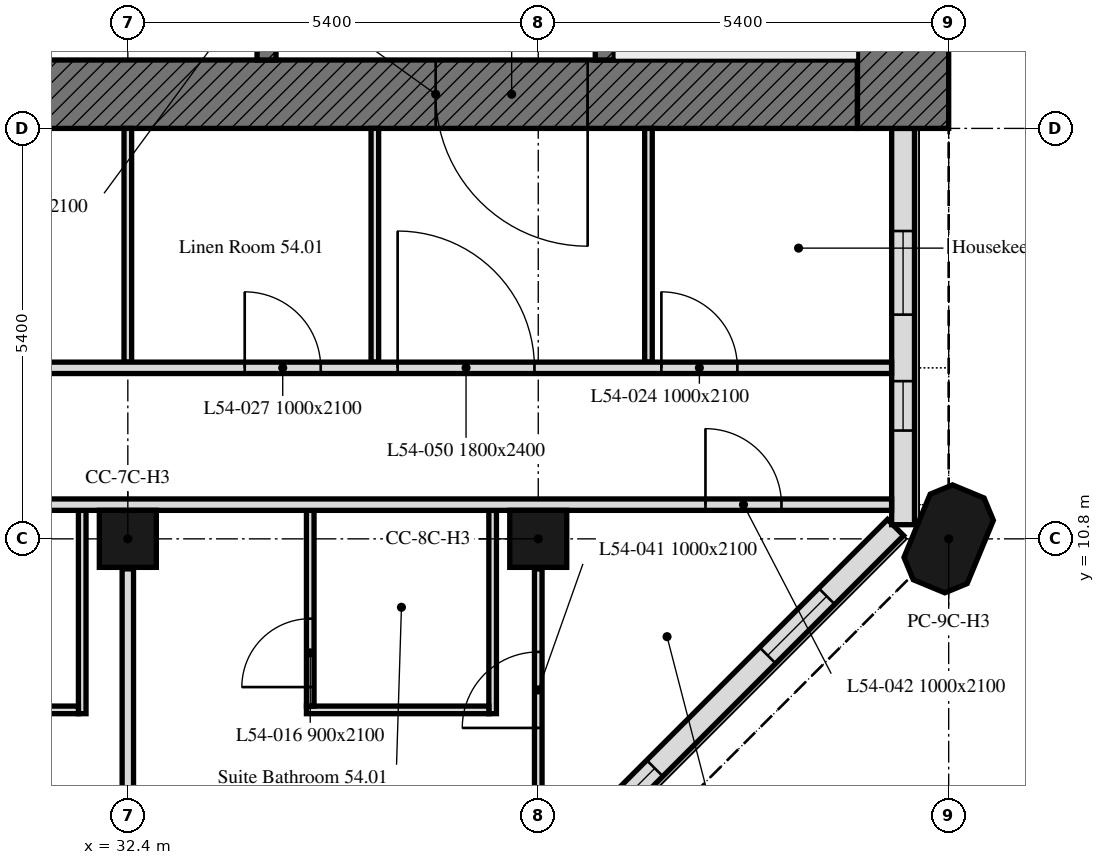
"""IFC4 building model, lengths in metres.
Left out: names, types, materials, properties, quantities, classifications, styles, units other than length and angle.
Written with IfcOpenShell. Run it as: python <this file> out.ifc"""

import sys

from ifc_helpers import new_model, si_unit, direction, frame, frame_2d, origin, origin_2d, place, context, subcontext, project, spatial, polyline, rectangle, outline, extrude, element, fill, save


model = new_model("IFC4")
c1 = context("Model", 3, precision=1e-05, world=origin(), true_north=direction((0.0, 1.0)))
c2 = subcontext(c1, "Body", "Model", "MODEL_VIEW")
j1 = project(units=[si_unit("LENGTHUNIT", "METRE"), si_unit("PLANEANGLEUNIT", "RADIAN")], contexts=[c1])
p1 = place(None, origin())
s1 = spatial("IfcSite", under=j1, at=p1, CompositionType="ELEMENT")
p2 = place(p1, origin())
s2 = spatial("IfcBuilding", under=s1, at=p2, CompositionType="ELEMENT")
p3 = place(p2, frame((0.0, 0.0, 217.0)))
s3 = spatial("IfcBuildingStorey", under=s2, at=p3, CompositionType="ELEMENT", Elevation=217.0)
for number, where, z_axis, x_axis in (
    (1, (32.4, 10.8, 0.0), (0.0, 0.0, 1.0), (1.0, 0.0, 0.0)),
    (2, (37.8, 10.8, 0.0), (0.0, 0.0, 1.0), (1.0, 0.0, 0.0)),
):
    element("IfcColumn", number, at=place(p3, frame(where, z_axis=z_axis, x_axis=x_axis)), inside=s3, PredefinedType="COLUMN", context=c2, shape_type="SweptSolid", body=[
        extrude(rectangle(XDim=0.75, YDim=0.75, at=origin_2d()), origin(), (0.0, 0.0, 1.0), 3.0),
    ])
p4 = place(p3, frame((43.2, 10.8, 0.0), z_axis=(0.0, 0.0, 1.0), x_axis=(0.382683432365, 0.923879532511, 0.0)))
e3 = element("IfcColumn", 3, at=p4, inside=s3, PredefinedType="COLUMN", context=c2, shape_type="SweptSolid", body=[
    extrude(outline(polyline([(-0.45, -0.45), (0.45, -0.45), (0.675, -0.225), (0.675, 0.225), (0.45, 0.45), (-0.45, 0.45), (-0.675, 0.225), (-0.675, -0.225), (-0.45, -0.45)])), origin(), (0.0, 0.0, 1.0), 3.0),
])
p5 = place(p3, frame((37.65, 6.099, 0.0), z_axis=(0.0, 0.0, 1.0), x_axis=(0.707106781187, 0.707106781187, 0.0)))
e4 = element("IfcWall", 4, at=p5, inside=s3, PredefinedType="SOLIDWALL", context=c2, shape_type="SweptSolid", body=[
    extrude(rectangle(XDim=6.86, YDim=0.3, at=frame_2d((3.43, 0.0))), origin(), (0.0, 0.0, 1.0), 3.0),
])
p6 = place(p5, frame((1.28, 0.0, 0.9)))
e5 = element("IfcOpeningElement", 5, at=p6, cuts=e4, PredefinedType="OPENING", context=c2, shape_type="SweptSolid", body=[
    extrude(rectangle(XDim=1.1, YDim=1.7, at=frame_2d((0.55, 0.85))), frame((0.0, 0.16, 0.0), z_axis=(0.0, -1.0, 0.0), x_axis=(1.0, 0.0, 0.0)), (0.0, 0.0, 1.0), 0.32),
])
p7 = place(p5, frame((4.48, 0.0, 0.9)))
e6 = element("IfcOpeningElement", 6, at=p7, cuts=e4, PredefinedType="OPENING", context=c2, shape_type="SweptSolid", body=[
    extrude(rectangle(XDim=1.1, YDim=1.7, at=frame_2d((0.55, 0.85))), frame((0.0, 0.16, 0.0), z_axis=(0.0, -1.0, 0.0), x_axis=(1.0, 0.0, 0.0)), (0.0, 0.0, 1.0), 0.32),
])
p8 = place(p3, frame((42.6, 10.986, 0.0), z_axis=(0.0, 0.0, 1.0), x_axis=(0.0, 1.0, 0.0)))
e7 = element("IfcWall", 7, at=p8, inside=s3, PredefinedType="SOLIDWALL", context=c2, shape_type="SweptSolid", body=[
    extrude(rectangle(XDim=5.214, YDim=0.3, at=frame_2d((2.607, 0.0))), origin(), (0.0, 0.0, 1.0), 3.0),
])
p9 = place(p8, frame((1.239, 0.0, 0.9)))
e8 = element("IfcOpeningElement", 8, at=p9, cuts=e7, PredefinedType="OPENING", context=c2, shape_type="SweptSolid", body=[
    extrude(rectangle(XDim=0.65, YDim=1.7, at=frame_2d((0.325, 0.85))), frame((0.0, 0.16, 0.0), z_axis=(0.0, -1.0, 0.0), x_axis=(1.0, 0.0, 0.0)), (0.0, 0.0, 1.0), 0.32),
])
p10 = place(p8, frame((2.764, 0.0, 0.9)))
e9 = element("IfcOpeningElement", 9, at=p10, cuts=e7, PredefinedType="OPENING", context=c2, shape_type="SweptSolid", body=[
    extrude(rectangle(XDim=1.1, YDim=1.7, at=frame_2d((0.55, 0.85))), frame((0.0, 0.16, 0.0), z_axis=(0.0, -1.0, 0.0), x_axis=(1.0, 0.0, 0.0)), (0.0, 0.0, 1.0), 0.32),
])
p11 = place(p3, frame((42.0, 16.65, 0.0), z_axis=(0.0, 0.0, 1.0), x_axis=(-1.0, 0.0, 0.0)))
e10 = element("IfcWall", 10, at=p11, inside=s3, PredefinedType="SOLIDWALL", context=c2, shape_type="SweptSolid", body=[
    extrude(rectangle(XDim=11.1, YDim=0.9, at=frame_2d((5.55, 0.0))), origin(), (0.0, 0.0, 1.0), 3.0),
])
p12 = place(p11, frame((3.55, 0.0, 0.0)))
e11 = element("IfcOpeningElement", 11, at=p12, cuts=e10, PredefinedType="OPENING", context=c2, shape_type="SweptSolid", body=[
    extrude(rectangle(XDim=2.0, YDim=2.4, at=frame_2d((1.0, 1.2))), frame((0.0, 0.45, 0.0), z_axis=(0.0, -1.0, 0.0), x_axis=(1.0, 0.0, 0.0)), (0.0, 0.0, 1.0), 0.9),
])
p13 = place(p3, frame((42.6, 32.4, 0.0), z_axis=(0.0, 0.0, 1.0), x_axis=(0.0, -1.0, 0.0)))
e12 = element("IfcWall", 12, at=p13, inside=s3, PredefinedType="SOLIDWALL", context=c2, shape_type="SweptSolid", body=[
    extrude(rectangle(XDim=16.2, YDim=1.2, at=frame_2d((8.1, 0.0))), origin(), (0.0, 0.0, 1.0), 3.0),
])
p14 = place(p3, frame((38.675, 17.1, 0.0), z_axis=(0.0, 0.0, 1.0), x_axis=(0.0, 1.0, 0.0)))
e13 = element("IfcWall", 13, at=p14, inside=s3, PredefinedType="SOLIDWALL", context=c2, shape_type="SweptSolid", body=[
    extrude(rectangle(XDim=14.4, YDim=0.25, at=frame_2d((7.2, 0.0))), origin(), (0.0, 0.0, 1.0), 3.0),
])
p15 = place(p14, frame((4.6, 0.0, 0.0)))
e14 = element("IfcOpeningElement", 14, at=p15, cuts=e13, PredefinedType="OPENING", context=c2, shape_type="SweptSolid", body=[
    extrude(rectangle(XDim=1.0, YDim=2.1, at=frame_2d((0.5, 1.05))), frame((0.0, 0.125, 0.0), z_axis=(0.0, -1.0, 0.0), x_axis=(1.0, 0.0, 0.0)), (0.0, 0.0, 1.0), 0.25),
])
p16 = place(p14, frame((7.062, 0.0, 0.0)))
e15 = element("IfcOpeningElement", 15, at=p16, cuts=e13, PredefinedType="OPENING", context=c2, shape_type="SweptSolid", body=[
    extrude(rectangle(XDim=1.2, YDim=2.1, at=frame_2d((0.6, 1.05))), frame((0.0, 0.125, 0.0), z_axis=(0.0, -1.0, 0.0), x_axis=(1.0, 0.0, 0.0)), (0.0, 0.0, 1.0), 0.25),
])
p17 = place(p14, frame((9.599, 0.0, 0.0)))
e16 = element("IfcOpeningElement", 16, at=p17, cuts=e13, PredefinedType="OPENING", context=c2, shape_type="SweptSolid", body=[
    extrude(rectangle(XDim=0.9, YDim=2.1, at=frame_2d((0.45, 1.05))), frame((0.0, 0.125, 0.0), z_axis=(0.0, -1.0, 0.0), x_axis=(1.0, 0.0, 0.0)), (0.0, 0.0, 1.0), 0.25),
])
p18 = place(p14, frame((11.032, 0.0, 0.0)))
e17 = element("IfcOpeningElement", 17, at=p18, cuts=e13, PredefinedType="OPENING", context=c2, shape_type="SweptSolid", body=[
    extrude(rectangle(XDim=0.9, YDim=2.1, at=frame_2d((0.45, 1.05))), frame((0.0, 0.125, 0.0), z_axis=(0.0, -1.0, 0.0), x_axis=(1.0, 0.0, 0.0)), (0.0, 0.0, 1.0), 0.25),
])
p19 = place(p14, frame((12.846, 0.0, 0.0)))
e18 = element("IfcOpeningElement", 18, at=p19, cuts=e13, PredefinedType="OPENING", context=c2, shape_type="SweptSolid", body=[
    extrude(rectangle(XDim=0.9, YDim=2.1, at=frame_2d((0.45, 1.05))), frame((0.0, 0.125, 0.0), z_axis=(0.0, -1.0, 0.0), x_axis=(1.0, 0.0, 0.0)), (0.0, 0.0, 1.0), 0.25),
])
p20 = place(p3, frame((34.225, 17.1, 0.0), z_axis=(0.0, 0.0, 1.0), x_axis=(0.0, 1.0, 0.0)))
e19 = element("IfcWall", 19, at=p20, inside=s3, PredefinedType="SOLIDWALL", context=c2, shape_type="SweptSolid", body=[
    extrude(rectangle(XDim=14.4, YDim=0.25, at=frame_2d((7.2, 0.0))), origin(), (0.0, 0.0, 1.0), 3.0),
])
p21 = place(p20, frame((13.15, 0.0, 0.0)))
e20 = element("IfcOpeningElement", 20, at=p21, cuts=e19, PredefinedType="OPENING", context=c2, shape_type="SweptSolid", body=[
    extrude(rectangle(XDim=1.0, YDim=2.1, at=frame_2d((0.5, 1.05))), frame((0.0, 0.125, 0.0), z_axis=(0.0, -1.0, 0.0), x_axis=(1.0, 0.0, 0.0)), (0.0, 0.0, 1.0), 0.25),
])
p22 = place(p20, frame((0.6, 0.0, 0.0)))
e21 = element("IfcOpeningElement", 21, at=p22, cuts=e19, PredefinedType="OPENING", context=c2, shape_type="SweptSolid", body=[
    extrude(rectangle(XDim=1.1, YDim=2.1, at=frame_2d((0.55, 1.05))), frame((0.0, 0.125, 0.0), z_axis=(0.0, -1.0, 0.0), x_axis=(1.0, 0.0, 0.0)), (0.0, 0.0, 1.0), 0.25),
])
p23 = place(p20, frame((3.25, 0.0, 0.0)))
e22 = element("IfcOpeningElement", 22, at=p23, cuts=e19, PredefinedType="OPENING", context=c2, shape_type="SweptSolid", body=[
    extrude(rectangle(XDim=0.9, YDim=2.1, at=frame_2d((0.45, 1.05))), frame((0.0, 0.125, 0.0), z_axis=(0.0, -1.0, 0.0), x_axis=(1.0, 0.0, 0.0)), (0.0, 0.0, 1.0), 0.25),
])
p24 = place(p3, frame((37.8, 6.512, 0.0), z_axis=(0.0, 0.0, 1.0), x_axis=(0.0, 1.0, 0.0)))
e23 = element("IfcWall", 23, at=p24, inside=s3, PredefinedType="PARTITIONING", context=c2, shape_type="SweptSolid", body=[
    extrude(rectangle(XDim=3.893, YDim=0.1, at=frame_2d((1.946, 0.0))), origin(), (0.0, 0.0, 1.0), 3.0),
])
p25 = place(p24, frame((1.8, 0.0, 0.0)))
e24 = element("IfcOpeningElement", 24, at=p25, cuts=e23, PredefinedType="OPENING", context=c2, shape_type="SweptSolid", body=[
    extrude(rectangle(XDim=1.0, YDim=2.1, at=frame_2d((0.5, 1.05))), frame((0.0, 0.05, 0.0), z_axis=(0.0, -1.0, 0.0), x_axis=(1.0, 0.0, 0.0)), (0.0, 0.0, 1.0), 0.1),
])
p26 = place(p3, frame((37.2, 11.175, 0.0), z_axis=(0.0, 0.0, 1.0), x_axis=(0.0, -1.0, 0.0)))
e25 = element("IfcWall", 25, at=p26, inside=s3, PredefinedType="PARTITIONING", context=c2, shape_type="SweptSolid", body=[
    extrude(rectangle(XDim=2.675, YDim=0.1, at=frame_2d((1.337, 0.0))), origin(), (0.0, 0.0, 1.0), 3.0),
])
p27 = place(p3, frame((37.15, 8.55, 0.0), z_axis=(0.0, 0.0, 1.0), x_axis=(-1.0, 0.0, 0.0)))
e26 = element("IfcWall", 26, at=p27, inside=s3, PredefinedType="PARTITIONING", context=c2, shape_type="SweptSolid", body=[
    extrude(rectangle(XDim=2.4, YDim=0.1, at=frame_2d((1.2, 0.0))), origin(), (0.0, 0.0, 1.0), 3.0),
])
p28 = place(p3, frame((34.8, 8.6, 0.0), z_axis=(0.0, 0.0, 1.0), x_axis=(0.0, 1.0, 0.0)))
e27 = element("IfcWall", 27, at=p28, inside=s3, PredefinedType="PARTITIONING", context=c2, shape_type="SweptSolid", body=[
    extrude(rectangle(XDim=2.575, YDim=0.1, at=frame_2d((1.288, 0.0))), origin(), (0.0, 0.0, 1.0), 3.0),
])
p29 = place(p28, frame((0.25, 0.0, 0.0)))
e28 = element("IfcOpeningElement", 28, at=p29, cuts=e27, PredefinedType="OPENING", context=c2, shape_type="SweptSolid", body=[
    extrude(rectangle(XDim=0.9, YDim=2.1, at=frame_2d((0.45, 1.05))), frame((0.0, 0.05, 0.0), z_axis=(0.0, -1.0, 0.0), x_axis=(1.0, 0.0, 0.0)), (0.0, 0.0, 1.0), 0.1),
])
p30 = place(p3, frame((32.4, 10.405, 0.0), z_axis=(0.0, 0.0, 1.0), x_axis=(0.0, -1.0, 0.0)))
e29 = element("IfcWall", 29, at=p30, inside=s3, PredefinedType="PARTITIONING", context=c2, shape_type="SweptSolid", body=[
    extrude(rectangle(XDim=4.254, YDim=0.15, at=frame_2d((2.127, 0.0))), origin(), (0.0, 0.0, 1.0), 3.0),
])
p31 = place(p3, frame((31.8, 11.175, 0.0), z_axis=(0.0, 0.0, 1.0), x_axis=(0.0, -1.0, 0.0)))
e30 = element("IfcWall", 30, at=p31, inside=s3, PredefinedType="PARTITIONING", context=c2, shape_type="SweptSolid", body=[
    extrude(rectangle(XDim=2.675, YDim=0.1, at=frame_2d((1.337, 0.0))), origin(), (0.0, 0.0, 1.0), 3.0),
])
p32 = place(p3, frame((31.75, 8.55, 0.0), z_axis=(0.0, 0.0, 1.0), x_axis=(-1.0, 0.0, 0.0)))
e31 = element("IfcWall", 31, at=p32, inside=s3, PredefinedType="PARTITIONING", context=c2, shape_type="SweptSolid", body=[
    extrude(rectangle(XDim=2.1, YDim=0.1, at=frame_2d((1.05, 0.0))), origin(), (0.0, 0.0, 1.0), 3.0),
])
p33 = place(p3, frame((0.751, 11.25, 0.0), z_axis=(0.0, 0.0, 1.0), x_axis=(1.0, 0.0, 0.0)))
e32 = element("IfcWall", 32, at=p33, inside=s3, PredefinedType="PARTITIONING", context=c2, shape_type="SweptSolid", body=[
    extrude(rectangle(XDim=41.698, YDim=0.15, at=frame_2d((20.849, 0.0))), origin(), (0.0, 0.0, 1.0), 3.0),
])
p34 = place(p33, frame((39.249, 0.0, 0.0)))
e33 = element("IfcOpeningElement", 33, at=p34, cuts=e32, PredefinedType="OPENING", context=c2, shape_type="SweptSolid", body=[
    extrude(rectangle(XDim=1.0, YDim=2.1, at=frame_2d((0.5, 1.05))), frame((0.0, 0.075, 0.0), z_axis=(0.0, -1.0, 0.0), x_axis=(1.0, 0.0, 0.0)), (0.0, 0.0, 1.0), 0.15),
])
p35 = place(p33, frame((27.649, 0.0, 0.0)))
e34 = element("IfcOpeningElement", 34, at=p35, cuts=e32, PredefinedType="OPENING", context=c2, shape_type="SweptSolid", body=[
    extrude(rectangle(XDim=1.0, YDim=2.1, at=frame_2d((0.5, 1.05))), frame((0.0, 0.075, 0.0), z_axis=(0.0, -1.0, 0.0), x_axis=(1.0, 0.0, 0.0)), (0.0, 0.0, 1.0), 0.15),
])
p36 = place(p33, frame((23.049, 0.0, 0.0)))
e35 = element("IfcOpeningElement", 35, at=p36, cuts=e32, PredefinedType="OPENING", context=c2, shape_type="SweptSolid", body=[
    extrude(rectangle(XDim=1.0, YDim=2.1, at=frame_2d((0.5, 1.05))), frame((0.0, 0.075, 0.0), z_axis=(0.0, -1.0, 0.0), x_axis=(1.0, 0.0, 0.0)), (0.0, 0.0, 1.0), 0.15),
])
p37 = place(p33, frame((11.449, 0.0, 0.0)))
e36 = element("IfcOpeningElement", 36, at=p37, cuts=e32, PredefinedType="OPENING", context=c2, shape_type="SweptSolid", body=[
    extrude(rectangle(XDim=1.0, YDim=2.1, at=frame_2d((0.5, 1.05))), frame((0.0, 0.075, 0.0), z_axis=(0.0, -1.0, 0.0), x_axis=(1.0, 0.0, 0.0)), (0.0, 0.0, 1.0), 0.15),
])
p38 = place(p33, frame((2.744, 0.0, 0.0)))
e37 = element("IfcOpeningElement", 37, at=p38, cuts=e32, PredefinedType="OPENING", context=c2, shape_type="SweptSolid", body=[
    extrude(rectangle(XDim=1.0, YDim=2.1, at=frame_2d((0.5, 1.05))), frame((0.0, 0.075, 0.0), z_axis=(0.0, -1.0, 0.0), x_axis=(1.0, 0.0, 0.0)), (0.0, 0.0, 1.0), 0.15),
])
for number, where, z_axis, x_axis in (
    (38, (32.4, 13.125, 0.0), (0.0, 0.0, 1.0), (0.0, 1.0, 0.0)),
    (39, (39.25, 13.125, 0.0), (0.0, 0.0, 1.0), (0.0, 1.0, 0.0)),
    (40, (35.65, 16.2, 0.0), (0.0, 0.0, 1.0), (0.0, -1.0, 0.0)),
):
    element("IfcWall", number, at=place(p3, frame(where, z_axis=z_axis, x_axis=x_axis)), inside=s3, PredefinedType="PARTITIONING", context=c2, shape_type="SweptSolid", body=[
        extrude(rectangle(XDim=3.075, YDim=0.1, at=frame_2d((1.538, 0.0))), origin(), (0.0, 0.0, 1.0), 3.0),
    ])
p39 = place(p3, frame((5.325, 13.05, 0.0), z_axis=(0.0, 0.0, 1.0), x_axis=(1.0, 0.0, 0.0)))
e41 = element("IfcWall", 41, at=p39, inside=s3, PredefinedType="PARTITIONING", context=c2, shape_type="SweptSolid", body=[
    extrude(rectangle(XDim=37.124, YDim=0.15, at=frame_2d((18.562, 0.0))), origin(), (0.0, 0.0, 1.0), 3.0),
])
p40 = place(p39, frame((23.875, 0.0, 0.0)))
e42 = element("IfcOpeningElement", 42, at=p40, cuts=e41, PredefinedType="OPENING", context=c2, shape_type="SweptSolid", body=[
    extrude(rectangle(XDim=1.0, YDim=2.1, at=frame_2d((0.5, 1.05))), frame((0.0, 0.075, 0.0), z_axis=(0.0, -1.0, 0.0), x_axis=(1.0, 0.0, 0.0)), (0.0, 0.0, 1.0), 0.15),
])
p41 = place(p39, frame((13.475, 0.0, 0.0)))
e43 = element("IfcOpeningElement", 43, at=p41, cuts=e41, PredefinedType="OPENING", context=c2, shape_type="SweptSolid", body=[
    extrude(rectangle(XDim=1.0, YDim=2.1, at=frame_2d((0.5, 1.05))), frame((0.0, 0.075, 0.0), z_axis=(0.0, -1.0, 0.0), x_axis=(1.0, 0.0, 0.0)), (0.0, 0.0, 1.0), 0.15),
])
p42 = place(p39, frame((34.095, 0.0, 0.0)))
e44 = element("IfcOpeningElement", 44, at=p42, cuts=e41, PredefinedType="OPENING", context=c2, shape_type="SweptSolid", body=[
    extrude(rectangle(XDim=1.0, YDim=2.1, at=frame_2d((0.5, 1.05))), frame((0.0, 0.075, 0.0), z_axis=(0.0, -1.0, 0.0), x_axis=(1.0, 0.0, 0.0)), (0.0, 0.0, 1.0), 0.15),
])
p43 = place(p39, frame((8.337, 0.0, 0.0)))
e45 = element("IfcOpeningElement", 45, at=p43, cuts=e41, PredefinedType="OPENING", context=c2, shape_type="SweptSolid", body=[
    extrude(rectangle(XDim=1.0, YDim=2.1, at=frame_2d((0.5, 1.05))), frame((0.0, 0.075, 0.0), z_axis=(0.0, -1.0, 0.0), x_axis=(1.0, 0.0, 0.0)), (0.0, 0.0, 1.0), 0.15),
])
p44 = place(p39, frame((1.648, 0.0, 0.0)))
e46 = element("IfcOpeningElement", 46, at=p44, cuts=e41, PredefinedType="OPENING", context=c2, shape_type="SweptSolid", body=[
    extrude(rectangle(XDim=1.0, YDim=2.1, at=frame_2d((0.5, 1.05))), frame((0.0, 0.075, 0.0), z_axis=(0.0, -1.0, 0.0), x_axis=(1.0, 0.0, 0.0)), (0.0, 0.0, 1.0), 0.15),
])
p45 = place(p39, frame((28.613, 0.0, 0.0)))
e47 = element("IfcOpeningElement", 47, at=p45, cuts=e41, PredefinedType="OPENING", context=c2, shape_type="SweptSolid", body=[
    extrude(rectangle(XDim=1.0, YDim=2.1, at=frame_2d((0.5, 1.05))), frame((0.0, 0.075, 0.0), z_axis=(0.0, -1.0, 0.0), x_axis=(1.0, 0.0, 0.0)), (0.0, 0.0, 1.0), 0.15),
])
p46 = place(p39, frame((30.625, 0.0, 0.0)))
e48 = element("IfcOpeningElement", 48, at=p46, cuts=e41, PredefinedType="OPENING", context=c2, shape_type="SweptSolid", body=[
    extrude(rectangle(XDim=1.8, YDim=2.4, at=frame_2d((0.9, 1.2))), frame((0.0, 0.075, 0.0), z_axis=(0.0, -1.0, 0.0), x_axis=(1.0, 0.0, 0.0)), (0.0, 0.0, 1.0), 0.15),
])
p47 = place(p39, frame((5.525, 0.0, 0.0)))
e49 = element("IfcOpeningElement", 49, at=p47, cuts=e41, PredefinedType="OPENING", context=c2, shape_type="SweptSolid", body=[
    extrude(rectangle(XDim=1.8, YDim=2.4, at=frame_2d((0.9, 1.2))), frame((0.0, 0.075, 0.0), z_axis=(0.0, -1.0, 0.0), x_axis=(1.0, 0.0, 0.0)), (0.0, 0.0, 1.0), 0.15),
])
p48 = place(p6, origin())
e50 = element("IfcWindow", 50, at=p48, inside=s3, PartitioningType="SINGLE_PANEL", PredefinedType="WINDOW", context=c2, shape_type="SweptSolid", body=[
    extrude(rectangle(XDim=1.1, YDim=1.7, at=frame_2d((0.55, 0.85))), frame((0.0, 0.03, 0.0), z_axis=(0.0, -1.0, 0.0), x_axis=(1.0, 0.0, 0.0)), (0.0, 0.0, 1.0), 0.06),
])
fill(e5, e50)
p49 = place(p7, origin())
e51 = element("IfcWindow", 51, at=p49, inside=s3, PartitioningType="SINGLE_PANEL", PredefinedType="WINDOW", context=c2, shape_type="SweptSolid", body=[
    extrude(rectangle(XDim=1.1, YDim=1.7, at=frame_2d((0.55, 0.85))), frame((0.0, 0.03, 0.0), z_axis=(0.0, -1.0, 0.0), x_axis=(1.0, 0.0, 0.0)), (0.0, 0.0, 1.0), 0.06),
])
fill(e6, e51)
p50 = place(p9, origin())
e52 = element("IfcWindow", 52, at=p50, inside=s3, PartitioningType="SINGLE_PANEL", PredefinedType="WINDOW", context=c2, shape_type="SweptSolid", body=[
    extrude(rectangle(XDim=0.65, YDim=1.7, at=frame_2d((0.325, 0.85))), frame((0.0, 0.03, 0.0), z_axis=(0.0, -1.0, 0.0), x_axis=(1.0, 0.0, 0.0)), (0.0, 0.0, 1.0), 0.06),
])
fill(e8, e52)
p51 = place(p10, origin())
e53 = element("IfcWindow", 53, at=p51, inside=s3, PartitioningType="SINGLE_PANEL", PredefinedType="WINDOW", context=c2, shape_type="SweptSolid", body=[
    extrude(rectangle(XDim=1.1, YDim=1.7, at=frame_2d((0.55, 0.85))), frame((0.0, 0.03, 0.0), z_axis=(0.0, -1.0, 0.0), x_axis=(1.0, 0.0, 0.0)), (0.0, 0.0, 1.0), 0.06),
])
fill(e9, e53)
p52 = place(p12, origin())
e54 = element("IfcDoor", 54, at=p52, inside=s3, OperationType="DOUBLE_DOOR_SINGLE_SWING", PredefinedType="DOOR", context=c2, shape_type="SweptSolid", body=[
    extrude(rectangle(XDim=2.0, YDim=2.4, at=frame_2d((1.0, 1.2))), frame((0.0, 0.025, 0.0), z_axis=(0.0, -1.0, 0.0), x_axis=(1.0, 0.0, 0.0)), (0.0, 0.0, 1.0), 0.05),
])
fill(e11, e54)
p53 = place(p29, origin())
e55 = element("IfcDoor", 55, at=p53, inside=s3, OperationType="SINGLE_SWING_RIGHT", PredefinedType="DOOR", context=c2, shape_type="SweptSolid", body=[
    extrude(rectangle(XDim=0.9, YDim=2.1, at=frame_2d((0.45, 1.05))), frame((0.0, 0.025, 0.0), z_axis=(0.0, -1.0, 0.0), x_axis=(1.0, 0.0, 0.0)), (0.0, 0.0, 1.0), 0.05),
])
fill(e28, e55)
p54 = place(p42, origin())
e56 = element("IfcDoor", 56, at=p54, inside=s3, OperationType="SINGLE_SWING_RIGHT", PredefinedType="DOOR", context=c2, shape_type="SweptSolid", body=[
    extrude(rectangle(XDim=1.0, YDim=2.1, at=frame_2d((0.5, 1.05))), frame((0.0, 0.025, 0.0), z_axis=(0.0, -1.0, 0.0), x_axis=(1.0, 0.0, 0.0)), (0.0, 0.0, 1.0), 0.05),
])
fill(e44, e56)
p55 = place(p45, origin())
e57 = element("IfcDoor", 57, at=p55, inside=s3, OperationType="SINGLE_SWING_LEFT", PredefinedType="DOOR", context=c2, shape_type="SweptSolid", body=[
    extrude(rectangle(XDim=1.0, YDim=2.1, at=frame_2d((0.5, 1.05))), frame((0.0, 0.025, 0.0), z_axis=(0.0, -1.0, 0.0), x_axis=(1.0, 0.0, 0.0)), (0.0, 0.0, 1.0), 0.05),
])
fill(e47, e57)
p56 = place(p25, origin())
e58 = element("IfcDoor", 58, at=p56, inside=s3, OperationType="SINGLE_SWING_RIGHT", PredefinedType="DOOR", context=c2, shape_type="SweptSolid", body=[
    extrude(rectangle(XDim=1.0, YDim=2.1, at=frame_2d((0.5, 1.05))), frame((0.0, 0.025, 0.0), z_axis=(0.0, -1.0, 0.0), x_axis=(1.0, 0.0, 0.0)), (0.0, 0.0, 1.0), 0.05),
])
fill(e24, e58)
p57 = place(p34, origin())
e59 = element("IfcDoor", 59, at=p57, inside=s3, OperationType="SINGLE_SWING_LEFT", PredefinedType="DOOR", context=c2, shape_type="SweptSolid", body=[
    extrude(rectangle(XDim=1.0, YDim=2.1, at=frame_2d((0.5, 1.05))), frame((0.0, 0.025, 0.0), z_axis=(0.0, -1.0, 0.0), x_axis=(1.0, 0.0, 0.0)), (0.0, 0.0, 1.0), 0.05),
])
fill(e33, e59)
p58 = place(p46, origin())
e60 = element("IfcDoor", 60, at=p58, inside=s3, OperationType="DOUBLE_DOOR_SINGLE_SWING", PredefinedType="DOOR", context=c2, shape_type="SweptSolid", body=[
    extrude(rectangle(XDim=1.8, YDim=2.4, at=frame_2d((0.9, 1.2))), frame((0.0, 0.025, 0.0), z_axis=(0.0, -1.0, 0.0), x_axis=(1.0, 0.0, 0.0)), (0.0, 0.0, 1.0), 0.05),
])
fill(e48, e60)
save(model, sys.argv[1])
